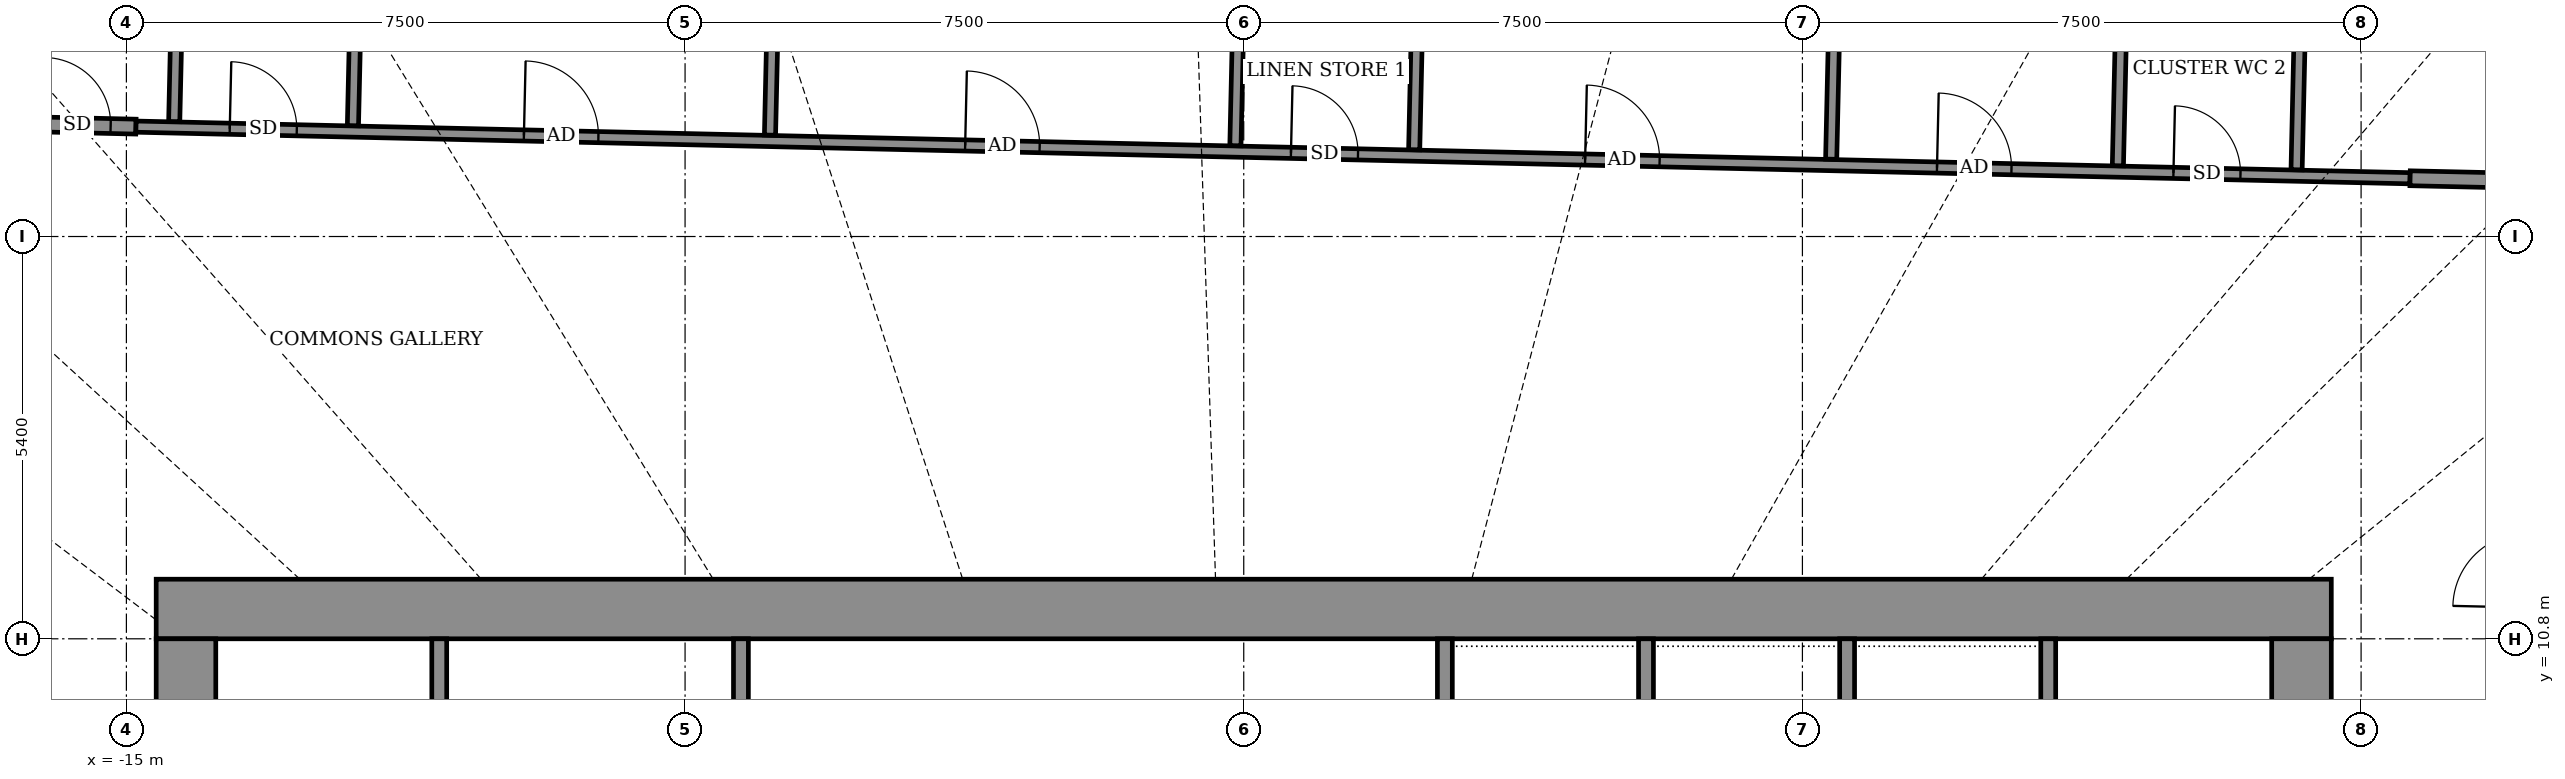
"""IFC4 building model, lengths in metres.
Left out: names, types, materials, properties, quantities, classifications, styles, units other than length and angle.
Written with IfcOpenShell. Run it as: python <this file> out.ifc"""

import sys

from ifc_helpers import new_model, si_unit, direction, frame, frame_2d, origin, place, context, subcontext, project, spatial, rectangle, extrude, element, fill, save


model = new_model("IFC4")
c1 = context("Model", 3, precision=1e-05, world=origin(), true_north=direction((0.0, 1.0)))
c2 = subcontext(c1, "Body", "Model", "MODEL_VIEW")
j1 = project(units=[si_unit("LENGTHUNIT", "METRE"), si_unit("PLANEANGLEUNIT", "RADIAN")], contexts=[c1])
p1 = place(None, origin())
s1 = spatial("IfcSite", under=j1, at=p1, CompositionType="ELEMENT")
p2 = place(p1, origin())
s2 = spatial("IfcBuilding", under=s1, at=p2, CompositionType="ELEMENT")
p3 = place(p2, frame((0.0, 0.0, 193.3)))
s3 = spatial("IfcBuildingStorey", under=s2, at=p3, CompositionType="ELEMENT", Elevation=193.3)
p4 = place(p3, frame((-16.965, 17.723, 0.0), z_axis=(0.0, 0.0, 1.0), x_axis=(0.999738756022, -0.022856502529, 0.0)))
e1 = element("IfcWall", 1, at=p4, inside=s3, PredefinedType="PARTITIONING", context=c2, shape_type="SweptSolid", body=[
    extrude(rectangle(XDim=2.094, YDim=0.2, at=frame_2d((1.047, 0.0))), origin(), (0.0, 0.0, 1.0), 2.85),
])
p5 = place(p4, frame((0.854, 0.0, 0.0)))
e2 = element("IfcOpeningElement", 2, at=p5, cuts=e1, PredefinedType="OPENING", context=c2, shape_type="SweptSolid", body=[
    extrude(rectangle(XDim=0.9, YDim=2.1, at=frame_2d((0.45, 1.05))), frame((0.0, 0.11, 0.0), z_axis=(0.0, -1.0, 0.0), x_axis=(1.0, 0.0, 0.0)), (0.0, 0.0, 1.0), 0.22),
])
p6 = place(p3, frame((-14.871, 17.675, 0.0), z_axis=(0.0, 0.0, 1.0), x_axis=(0.999742359486, -0.02269834024, 0.0)))
e3 = element("IfcWall", 3, at=p6, inside=s3, PredefinedType="PARTITIONING", context=c2, shape_type="SweptSolid", body=[
    extrude(rectangle(XDim=30.536, YDim=0.15, at=frame_2d((15.268, 0.0))), origin(), (0.0, 0.0, 1.0), 2.55),
])
p7 = place(p6, frame((24.184, 0.0, 0.0)))
e4 = element("IfcOpeningElement", 4, at=p7, cuts=e3, PredefinedType="OPENING", context=c2, shape_type="SweptSolid", body=[
    extrude(rectangle(XDim=1.0, YDim=2.1, at=frame_2d((0.5, 1.05))), frame((0.0, 0.085, 0.0), z_axis=(0.0, -1.0, 0.0), x_axis=(1.0, 0.0, 0.0)), (0.0, 0.0, 1.0), 0.17),
])
p8 = place(p6, frame((27.359, 0.0, 0.0)))
e5 = element("IfcOpeningElement", 5, at=p8, cuts=e3, PredefinedType="OPENING", context=c2, shape_type="SweptSolid", body=[
    extrude(rectangle(XDim=0.9, YDim=2.1, at=frame_2d((0.45, 1.05))), frame((0.0, 0.085, 0.0), z_axis=(0.0, -1.0, 0.0), x_axis=(1.0, 0.0, 0.0)), (0.0, 0.0, 1.0), 0.17),
])
p9 = place(p6, frame((19.459, 0.0, 0.0)))
e6 = element("IfcOpeningElement", 6, at=p9, cuts=e3, PredefinedType="OPENING", context=c2, shape_type="SweptSolid", body=[
    extrude(rectangle(XDim=1.0, YDim=2.1, at=frame_2d((0.5, 1.05))), frame((0.0, 0.085, 0.0), z_axis=(0.0, -1.0, 0.0), x_axis=(1.0, 0.0, 0.0)), (0.0, 0.0, 1.0), 0.17),
])
p10 = place(p6, frame((15.509, 0.0, 0.0)))
e7 = element("IfcOpeningElement", 7, at=p10, cuts=e3, PredefinedType="OPENING", context=c2, shape_type="SweptSolid", body=[
    extrude(rectangle(XDim=0.9, YDim=2.1, at=frame_2d((0.45, 1.05))), frame((0.0, 0.085, 0.0), z_axis=(0.0, -1.0, 0.0), x_axis=(1.0, 0.0, 0.0)), (0.0, 0.0, 1.0), 0.17),
])
p11 = place(p6, frame((11.134, 0.0, 0.0)))
e8 = element("IfcOpeningElement", 8, at=p11, cuts=e3, PredefinedType="OPENING", context=c2, shape_type="SweptSolid", body=[
    extrude(rectangle(XDim=1.0, YDim=2.1, at=frame_2d((0.5, 1.05))), frame((0.0, 0.085, 0.0), z_axis=(0.0, -1.0, 0.0), x_axis=(1.0, 0.0, 0.0)), (0.0, 0.0, 1.0), 0.17),
])
p12 = place(p6, frame((5.209, 0.0, 0.0)))
e9 = element("IfcOpeningElement", 9, at=p12, cuts=e3, PredefinedType="OPENING", context=c2, shape_type="SweptSolid", body=[
    extrude(rectangle(XDim=1.0, YDim=2.1, at=frame_2d((0.5, 1.05))), frame((0.0, 0.085, 0.0), z_axis=(0.0, -1.0, 0.0), x_axis=(1.0, 0.0, 0.0)), (0.0, 0.0, 1.0), 0.17),
])
p13 = place(p6, frame((1.259, 0.0, 0.0)))
e10 = element("IfcOpeningElement", 10, at=p13, cuts=e3, PredefinedType="OPENING", context=c2, shape_type="SweptSolid", body=[
    extrude(rectangle(XDim=0.9, YDim=2.1, at=frame_2d((0.45, 1.05))), frame((0.0, 0.085, 0.0), z_axis=(0.0, -1.0, 0.0), x_axis=(1.0, 0.0, 0.0)), (0.0, 0.0, 1.0), 0.17),
])
p14 = place(p3, frame((15.658, 16.982, 0.0), z_axis=(0.0, 0.0, 1.0), x_axis=(0.999747041942, -0.022491156656, 0.0)))
e11 = element("IfcWall", 11, at=p14, inside=s3, PredefinedType="PARTITIONING", context=c2, shape_type="SweptSolid", body=[
    extrude(rectangle(XDim=4.841, YDim=0.2, at=frame_2d((2.421, 0.0))), origin(), (0.0, 0.0, 1.0), 2.75),
])
p15 = place(p14, frame((2.676, 0.0, 0.0)))
e12 = element("IfcOpeningElement", 12, at=p15, cuts=e11, PredefinedType="OPENING", context=c2, shape_type="SweptSolid", body=[
    extrude(rectangle(XDim=1.0, YDim=2.1, at=frame_2d((0.5, 1.05))), frame((0.0, 0.11, 0.0), z_axis=(0.0, -1.0, 0.0), x_axis=(1.0, 0.0, 0.0)), (0.0, 0.0, 1.0), 0.22),
])
p16 = place(p3, frame((-14.358, 17.743, 0.0), z_axis=(0.0, 0.0, 1.0), x_axis=(0.022702393474, 0.999742267452, 0.0)))
e13 = element("IfcWall", 13, at=p16, inside=s3, PredefinedType="PARTITIONING", context=c2, shape_type="SweptSolid", body=[
    extrude(rectangle(XDim=7.001, YDim=0.15, at=frame_2d((3.5, 0.0))), origin(), (0.0, 0.0, 1.0), 2.65),
])
p17 = place(p3, frame((-11.959, 17.688, 0.0), z_axis=(0.0, 0.0, 1.0), x_axis=(0.022758040381, 0.999741002259, 0.0)))
e14 = element("IfcWall", 14, at=p17, inside=s3, PredefinedType="PARTITIONING", context=c2, shape_type="SweptSolid", body=[
    extrude(rectangle(XDim=2.725, YDim=0.15, at=frame_2d((1.362, 0.0))), origin(), (0.0, 0.0, 1.0), 2.75),
])
p18 = place(p3, frame((-6.36, 17.561, 0.0), z_axis=(0.0, 0.0, 1.0), x_axis=(0.022737248567, 0.999741475346, 0.0)))
e15 = element("IfcWall", 15, at=p18, inside=s3, PredefinedType="PARTITIONING", context=c2, shape_type="SweptSolid", body=[
    extrude(rectangle(XDim=7.001, YDim=0.15, at=frame_2d((3.5, 0.0))), origin(), (0.0, 0.0, 1.0), 2.65),
])
p19 = place(p3, frame((-0.112, 17.419, 0.0), z_axis=(0.0, 0.0, 1.0), x_axis=(0.022734078158, 0.999741547446, 0.0)))
e16 = element("IfcWall", 16, at=p19, inside=s3, PredefinedType="PARTITIONING", context=c2, shape_type="SweptSolid", body=[
    extrude(rectangle(XDim=7.002, YDim=0.15, at=frame_2d((3.501, 0.0))), origin(), (0.0, 0.0, 1.0), 2.65),
])
p20 = place(p3, frame((2.288, 17.365, 0.0), z_axis=(0.0, 0.0, 1.0), x_axis=(0.022523020646, 0.999746324595, 0.0)))
e17 = element("IfcWall", 17, at=p20, inside=s3, PredefinedType="PARTITIONING", context=c2, shape_type="SweptSolid", body=[
    extrude(rectangle(XDim=2.125, YDim=0.15, at=frame_2d((1.062, 0.0))), origin(), (0.0, 0.0, 1.0), 4.05),
])
p21 = place(p3, frame((7.886, 17.238, 0.0), z_axis=(0.0, 0.0, 1.0), x_axis=(0.022702393474, 0.999742267452, 0.0)))
e18 = element("IfcWall", 18, at=p21, inside=s3, PredefinedType="PARTITIONING", context=c2, shape_type="SweptSolid", body=[
    extrude(rectangle(XDim=7.001, YDim=0.15, at=frame_2d((3.5, 0.0))), origin(), (0.0, 0.0, 1.0), 2.85),
])
p22 = place(p3, frame((11.735, 17.15, 0.0), z_axis=(0.0, 0.0, 1.0), x_axis=(0.022749889061, 0.999741187782, 0.0)))
e19 = element("IfcWall", 19, at=p22, inside=s3, PredefinedType="PARTITIONING", context=c2, shape_type="SweptSolid", body=[
    extrude(rectangle(XDim=2.726, YDim=0.15, at=frame_2d((1.363, 0.0))), origin(), (0.0, 0.0, 1.0), 2.75),
])
p23 = place(p3, frame((14.134, 17.096, 0.0), z_axis=(0.0, 0.0, 1.0), x_axis=(0.022702393474, 0.999742267452, 0.0)))
e20 = element("IfcWall", 20, at=p23, inside=s3, PredefinedType="PARTITIONING", context=c2, shape_type="SweptSolid", body=[
    extrude(rectangle(XDim=7.001, YDim=0.15, at=frame_2d((3.5, 0.0))), origin(), (0.0, 0.0, 1.0), 2.55),
])
p24 = place(p3, frame((-14.6, 11.2, 0.0), z_axis=(0.0, 0.0, 1.0), x_axis=(1.0, 0.0, 0.0)))
e21 = element("IfcWall", 21, at=p24, inside=s3, PredefinedType="SHEAR", context=c2, shape_type="SweptSolid", body=[
    extrude(rectangle(XDim=29.2, YDim=0.8, at=frame_2d((14.6, 0.0))), origin(), (0.0, 0.0, 1.0), 4.6),
])
p25 = place(p3, frame((-14.2, -10.8, 0.0), z_axis=(0.0, 0.0, 1.0), x_axis=(0.0, 1.0, 0.0)))
e22 = element("IfcWall", 22, at=p25, inside=s3, PredefinedType="SHEAR", context=c2, shape_type="SweptSolid", body=[
    extrude(rectangle(XDim=21.6, YDim=0.8, at=frame_2d((10.8, 0.0))), origin(), (0.0, 0.0, 1.0), 4.6),
])
p26 = place(p25, frame((8.25, 0.0, 0.0)))
e23 = element("IfcOpeningElement", 23, at=p26, cuts=e22, PredefinedType="OPENING", context=c2, shape_type="SweptSolid", body=[
    extrude(rectangle(XDim=1.2, YDim=2.1, at=frame_2d((0.6, 1.05))), frame((0.0, 0.41, 0.0), z_axis=(0.0, -1.0, 0.0), x_axis=(1.0, 0.0, 0.0)), (0.0, 0.0, 1.0), 0.82),
])
p27 = place(p25, frame((15.25, 0.0, 0.0)))
e24 = element("IfcOpeningElement", 24, at=p27, cuts=e22, PredefinedType="OPENING", context=c2, shape_type="SweptSolid", body=[
    extrude(rectangle(XDim=1.2, YDim=2.1, at=frame_2d((0.6, 1.05))), frame((0.0, 0.41, 0.0), z_axis=(0.0, -1.0, 0.0), x_axis=(1.0, 0.0, 0.0)), (0.0, 0.0, 1.0), 0.82),
])
p28 = place(p3, frame((14.2, -10.8, 0.0), z_axis=(0.0, 0.0, 1.0), x_axis=(0.0, 1.0, 0.0)))
e25 = element("IfcWall", 25, at=p28, inside=s3, PredefinedType="SHEAR", context=c2, shape_type="SweptSolid", body=[
    extrude(rectangle(XDim=21.6, YDim=0.8, at=frame_2d((10.8, 0.0))), origin(), (0.0, 0.0, 1.0), 4.6),
])
p29 = place(p28, frame((1.2, 0.0, 0.0)))
e26 = element("IfcOpeningElement", 26, at=p29, cuts=e25, PredefinedType="OPENING", context=c2, shape_type="SweptSolid", body=[
    extrude(rectangle(XDim=1.2, YDim=2.1, at=frame_2d((0.6, 1.05))), frame((0.0, 0.41, 0.0), z_axis=(0.0, -1.0, 0.0), x_axis=(1.0, 0.0, 0.0)), (0.0, 0.0, 1.0), 0.82),
])
for number, where, z_axis, x_axis in (
    (27, (-10.8, 8.2, 0.0), (0.0, 0.0, 1.0), (0.0, 1.0, 0.0)),
    (28, (-6.75, 8.2, 0.0), (0.0, 0.0, 1.0), (0.0, 1.0, 0.0)),
):
    element("IfcWall", number, at=place(p3, frame(where, z_axis=z_axis, x_axis=x_axis)), inside=s3, PredefinedType="STANDARD", context=c2, shape_type="SweptSolid", body=[
        extrude(rectangle(XDim=2.6, YDim=0.2, at=frame_2d((1.3, 0.0))), origin(), (0.0, 0.0, 1.0), 4.05),
    ])
for number, where, z_axis, x_axis in (
    (29, (2.7, 8.2, 0.0), (0.0, 0.0, 1.0), (0.0, 1.0, 0.0)),
    (30, (5.4, 8.2, 0.0), (0.0, 0.0, 1.0), (0.0, 1.0, 0.0)),
    (31, (8.1, 8.2, 0.0), (0.0, 0.0, 1.0), (0.0, 1.0, 0.0)),
    (32, (10.8, 8.2, 0.0), (0.0, 0.0, 1.0), (0.0, 1.0, 0.0)),
):
    element("IfcWall", number, at=place(p3, frame(where, z_axis=z_axis, x_axis=x_axis)), inside=s3, PredefinedType="SHEAR", context=c2, shape_type="SweptSolid", body=[
        extrude(rectangle(XDim=2.6, YDim=0.2, at=frame_2d((1.3, 0.0))), origin(), (0.0, 0.0, 1.0), 4.05),
    ])
p30 = place(p7, origin())
e33 = element("IfcDoor", 33, at=p30, inside=s3, OperationType="SINGLE_SWING_LEFT", PredefinedType="DOOR", context=c2, shape_type="SweptSolid", body=[
    extrude(rectangle(XDim=1.0, YDim=2.1, at=frame_2d((0.5, 1.05))), frame((0.0, 0.025, 0.0), z_axis=(0.0, -1.0, 0.0), x_axis=(1.0, 0.0, 0.0)), (0.0, 0.0, 1.0), 0.05),
])
fill(e4, e33)
p31 = place(p8, origin())
e34 = element("IfcDoor", 34, at=p31, inside=s3, OperationType="SINGLE_SWING_LEFT", PredefinedType="DOOR", context=c2, shape_type="SweptSolid", body=[
    extrude(rectangle(XDim=0.9, YDim=2.1, at=frame_2d((0.45, 1.05))), frame((0.0, 0.025, 0.0), z_axis=(0.0, -1.0, 0.0), x_axis=(1.0, 0.0, 0.0)), (0.0, 0.0, 1.0), 0.05),
])
fill(e5, e34)
p32 = place(p9, origin())
e35 = element("IfcDoor", 35, at=p32, inside=s3, OperationType="SINGLE_SWING_RIGHT", PredefinedType="DOOR", context=c2, shape_type="SweptSolid", body=[
    extrude(rectangle(XDim=1.0, YDim=2.1, at=frame_2d((0.5, 1.05))), frame((0.0, 0.025, 0.0), z_axis=(0.0, -1.0, 0.0), x_axis=(1.0, 0.0, 0.0)), (0.0, 0.0, 1.0), 0.05),
])
fill(e6, e35)
p33 = place(p10, origin())
e36 = element("IfcDoor", 36, at=p33, inside=s3, OperationType="SINGLE_SWING_RIGHT", PredefinedType="DOOR", context=c2, shape_type="SweptSolid", body=[
    extrude(rectangle(XDim=0.9, YDim=2.1, at=frame_2d((0.45, 1.05))), frame((0.0, 0.025, 0.0), z_axis=(0.0, -1.0, 0.0), x_axis=(1.0, 0.0, 0.0)), (0.0, 0.0, 1.0), 0.05),
])
fill(e7, e36)
p34 = place(p11, origin())
e37 = element("IfcDoor", 37, at=p34, inside=s3, OperationType="SINGLE_SWING_LEFT", PredefinedType="DOOR", context=c2, shape_type="SweptSolid", body=[
    extrude(rectangle(XDim=1.0, YDim=2.1, at=frame_2d((0.5, 1.05))), frame((0.0, 0.025, 0.0), z_axis=(0.0, -1.0, 0.0), x_axis=(1.0, 0.0, 0.0)), (0.0, 0.0, 1.0), 0.05),
])
fill(e8, e37)
p35 = place(p12, origin())
e38 = element("IfcDoor", 38, at=p35, inside=s3, OperationType="SINGLE_SWING_RIGHT", PredefinedType="DOOR", context=c2, shape_type="SweptSolid", body=[
    extrude(rectangle(XDim=1.0, YDim=2.1, at=frame_2d((0.5, 1.05))), frame((0.0, 0.025, 0.0), z_axis=(0.0, -1.0, 0.0), x_axis=(1.0, 0.0, 0.0)), (0.0, 0.0, 1.0), 0.05),
])
fill(e9, e38)
p36 = place(p13, origin())
e39 = element("IfcDoor", 39, at=p36, inside=s3, OperationType="SINGLE_SWING_LEFT", PredefinedType="DOOR", context=c2, shape_type="SweptSolid", body=[
    extrude(rectangle(XDim=0.9, YDim=2.1, at=frame_2d((0.45, 1.05))), frame((0.0, 0.025, 0.0), z_axis=(0.0, -1.0, 0.0), x_axis=(1.0, 0.0, 0.0)), (0.0, 0.0, 1.0), 0.05),
])
fill(e10, e39)
p37 = place(p5, origin())
e40 = element("IfcDoor", 40, at=p37, inside=s3, OperationType="SINGLE_SWING_RIGHT", PredefinedType="DOOR", context=c2, shape_type="SweptSolid", body=[
    extrude(rectangle(XDim=0.9, YDim=2.1, at=frame_2d((0.45, 1.05))), frame((0.0, 0.025, 0.0), z_axis=(0.0, -1.0, 0.0), x_axis=(1.0, 0.0, 0.0)), (0.0, 0.0, 1.0), 0.05),
])
fill(e2, e40)
save(model, sys.argv[1])
